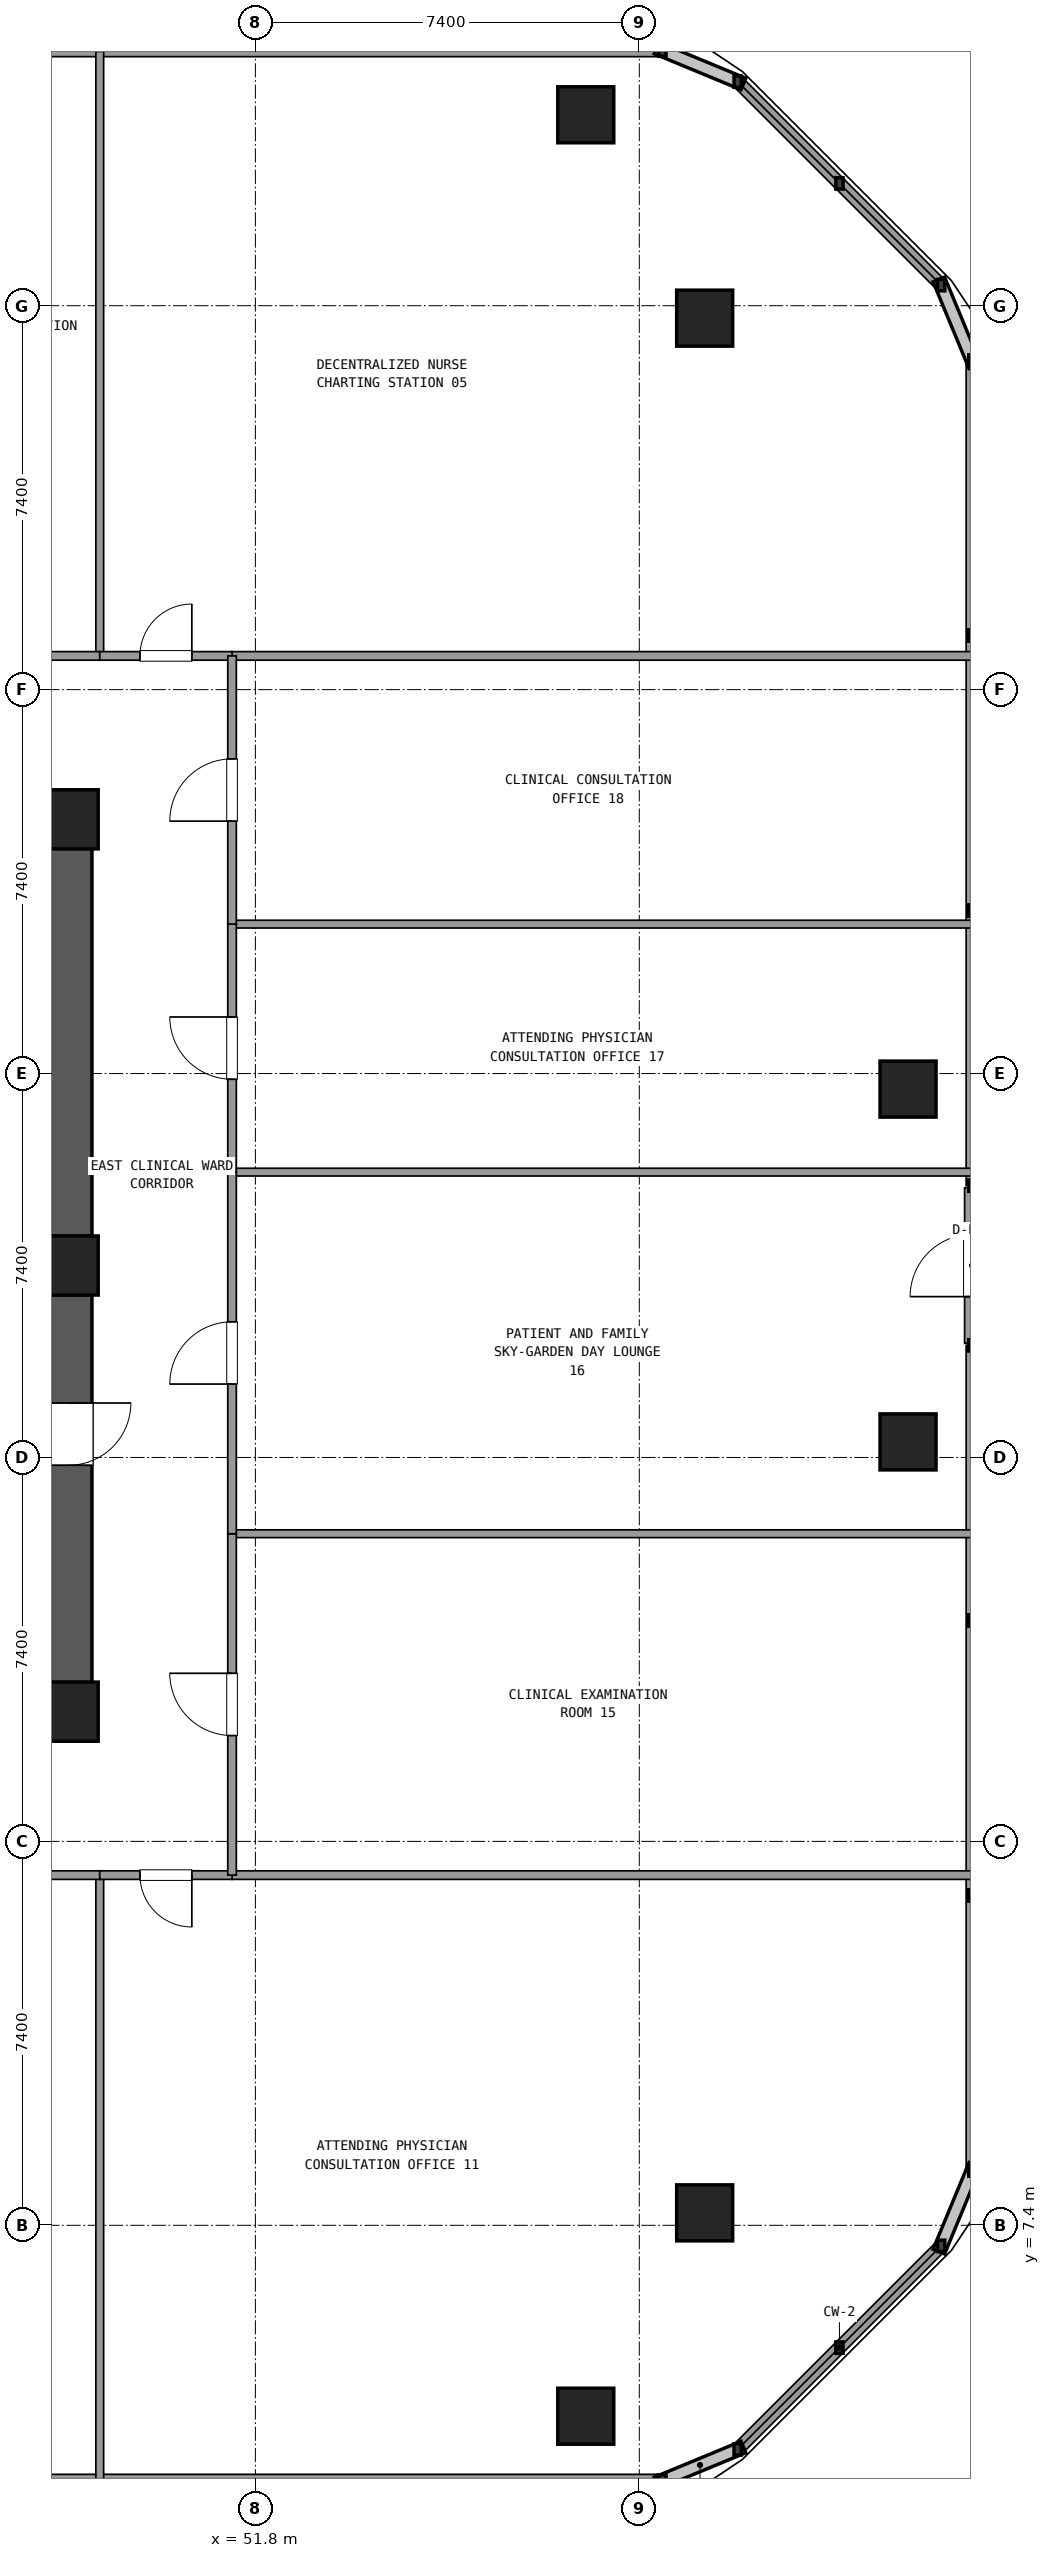
"""IFC4 building model, lengths in metres.
Left out: names, types, materials, properties, quantities, classifications, styles, units other than length and angle.
Written with IfcOpenShell. Run it as: python <this file> out.ifc"""

import sys

from ifc_helpers import new_model, si_unit, direction, frame, frame_2d, origin, origin_2d, place, context, subcontext, project, spatial, rectangle, extrude, element, fill, save


model = new_model("IFC4")
c1 = context("Model", 3, precision=1e-05, world=origin(), true_north=direction((0.0, 1.0)))
c2 = subcontext(c1, "Body", "Model", "MODEL_VIEW")
j1 = project(units=[si_unit("LENGTHUNIT", "METRE"), si_unit("PLANEANGLEUNIT", "RADIAN")], contexts=[c1])
p1 = place(None, origin())
s1 = spatial("IfcSite", under=j1, at=p1, CompositionType="ELEMENT")
p2 = place(p1, origin())
s2 = spatial("IfcBuilding", under=s1, at=p2, CompositionType="ELEMENT")
p3 = place(p2, frame((0.0, 0.0, 27.54)))
s3 = spatial("IfcBuildingStorey", under=s2, at=p3, CompositionType="ELEMENT", Elevation=27.54)
for number, where, z_axis, x_axis in (
    (1, (48.2, 17.3, 0.0), (0.0, 0.0, 1.0), (1.0, 0.0, 0.0)),
    (2, (48.2, 25.9, 0.0), (0.0, 0.0, 1.0), (1.0, 0.0, 0.0)),
    (3, (48.2, 34.5, 0.0), (0.0, 0.0, 1.0), (1.0, 0.0, 0.0)),
):
    element("IfcColumn", number, at=place(p3, frame(where, z_axis=z_axis, x_axis=x_axis)), inside=s3, PredefinedType="COLUMN", context=c2, shape_type="SweptSolid", body=[
        extrude(rectangle(XDim=1.14, YDim=1.14, at=origin_2d()), origin(), (0.0, 0.0, 1.0), 3.6),
    ])
p4 = place(p3, frame((48.2, 17.865, 0.0), z_axis=(0.0, 0.0, 1.0), x_axis=(0.0, 1.0, 0.0)))
e4 = element("IfcWall", 4, at=p4, inside=s3, PredefinedType="SHEAR", context=c2, shape_type="SweptSolid", body=[
    extrude(rectangle(XDim=7.47, YDim=0.9, at=frame_2d((3.735, 0.0))), origin(), (0.0, 0.0, 1.0), 3.32),
])
p5 = place(p4, frame((4.185, 0.0, 0.0)))
e5 = element("IfcOpeningElement", 5, at=p5, cuts=e4, PredefinedType="OPENING", context=c2, shape_type="SweptSolid", body=[
    extrude(rectangle(XDim=1.2, YDim=2.15, at=frame_2d((0.6, 1.075))), frame((0.0, 0.46, 0.0), z_axis=(0.0, -1.0, 0.0), x_axis=(1.0, 0.0, 0.0)), (0.0, 0.0, 1.0), 0.92),
])
p6 = place(p3, frame((48.2, 26.465, 0.0), z_axis=(0.0, 0.0, 1.0), x_axis=(0.0, 1.0, 0.0)))
e6 = element("IfcWall", 6, at=p6, inside=s3, PredefinedType="SHEAR", context=c2, shape_type="SweptSolid", body=[
    extrude(rectangle(XDim=7.47, YDim=0.9, at=frame_2d((3.735, 0.0))), origin(), (0.0, 0.0, 1.0), 3.32),
])
for number, where, z_axis, x_axis in (
    (7, (58.168, 3.72, 0.0), (0.0, 0.0, 1.0), (1.0, 0.0, 0.0)),
    (8, (60.46, 7.64, 0.0), (0.0, 0.0, 1.0), (1.0, 0.0, 0.0)),
    (9, (64.38, 22.5, 0.0), (0.0, 0.0, 1.0), (1.0, 0.0, 0.0)),
    (10, (64.38, 29.3, 0.0), (0.0, 0.0, 1.0), (1.0, 0.0, 0.0)),
    (11, (60.46, 44.16, 0.0), (0.0, 0.0, 1.0), (1.0, 0.0, 0.0)),
    (12, (58.168, 48.08, 0.0), (0.0, 0.0, 1.0), (1.0, 0.0, 0.0)),
):
    element("IfcColumn", number, at=place(p3, frame(where, z_axis=z_axis, x_axis=x_axis)), inside=s3, PredefinedType="COLUMN", context=c2, shape_type="SweptSolid", body=[
        extrude(rectangle(XDim=1.08, YDim=1.08, at=origin_2d()), origin(), (0.0, 0.0, 1.0), 3.6),
    ])
p7 = place(p3, frame((14.355, 2.48, 0.0), z_axis=(0.0, 0.0, 1.0), x_axis=(1.0, 0.0, 0.0)))
e13 = element("IfcWall", 13, at=p7, inside=s3, PredefinedType="SOLIDWALL", context=c2, shape_type="SweptSolid", body=[
    extrude(rectangle(XDim=45.29, YDim=0.24, at=frame_2d((22.645, 0.0))), origin(), (0.0, 0.0, 1.0), 0.85),
])
p8 = place(p3, frame((61.096, 3.081, 0.0), z_axis=(0.0, 0.0, 1.0), x_axis=(0.707128783731, 0.707084777957, 0.0)))
e14 = element("IfcWall", 14, at=p8, inside=s3, PredefinedType="SOLIDWALL", context=c2, shape_type="SweptSolid", body=[
    extrude(rectangle(XDim=5.548, YDim=0.24, at=frame_2d((2.774, 0.0))), origin(), (0.0, 0.0, 1.0), 0.85),
])
p9 = place(p3, frame((65.62, 24.4, 0.0), z_axis=(0.0, 0.0, 1.0), x_axis=(0.0, 1.0, 0.0)))
e15 = element("IfcWall", 15, at=p9, inside=s3, PredefinedType="SOLIDWALL", context=c2, shape_type="SweptSolid", body=[
    extrude(rectangle(XDim=3.0, YDim=0.3, at=frame_2d((1.5, 0.0))), origin(), (0.0, 0.0, 1.0), 2.65),
])
p10 = place(p9, frame((0.9, 0.0, 0.0)))
e16 = element("IfcOpeningElement", 16, at=p10, cuts=e15, PredefinedType="OPENING", context=c2, shape_type="SweptSolid", body=[
    extrude(rectangle(XDim=1.2, YDim=2.2, at=frame_2d((0.6, 1.1))), frame((0.0, 0.16, 0.0), z_axis=(0.0, -1.0, 0.0), x_axis=(1.0, 0.0, 0.0)), (0.0, 0.0, 1.0), 0.32),
])
for number, where, z_axis, x_axis in (
    (17, (65.62, 8.455, 0.0), (0.0, 0.0, 1.0), (0.0, 1.0, 0.0)),
    (18, (65.62, 27.44, 0.0), (0.0, 0.0, 1.0), (0.0, 1.0, 0.0)),
):
    element("IfcWall", number, at=place(p3, frame(where, z_axis=z_axis, x_axis=x_axis)), inside=s3, PredefinedType="SOLIDWALL", context=c2, shape_type="SweptSolid", body=[
        extrude(rectangle(XDim=15.905, YDim=0.24, at=frame_2d((7.953, 0.0))), origin(), (0.0, 0.0, 1.0), 0.85),
    ])
p11 = place(p3, frame((65.019, 44.796, 0.0), z_axis=(0.0, 0.0, 1.0), x_axis=(-0.707106781187, 0.707106781187, 0.0)))
e19 = element("IfcWall", 19, at=p11, inside=s3, PredefinedType="SOLIDWALL", context=c2, shape_type="SweptSolid", body=[
    extrude(rectangle(XDim=5.548, YDim=0.24, at=frame_2d((2.774, 0.0))), origin(), (0.0, 0.0, 1.0), 0.85),
])
p12 = place(p3, frame((59.645, 49.32, 0.0), z_axis=(0.0, 0.0, 1.0), x_axis=(-1.0, 0.0, 0.0)))
e20 = element("IfcWall", 20, at=p12, inside=s3, PredefinedType="SOLIDWALL", context=c2, shape_type="SweptSolid", body=[
    extrude(rectangle(XDim=45.29, YDim=0.24, at=frame_2d((22.645, 0.0))), origin(), (0.0, 0.0, 1.0), 0.85),
])
for number, where, z_axis, x_axis in (
    (21, (51.35, 37.65, 0.0), (0.0, 0.0, 1.0), (1.0, 0.0, 0.0)),
    (22, (51.35, 14.15, 0.0), (0.0, 0.0, 1.0), (1.0, 0.0, 0.0)),
):
    element("IfcWall", number, at=place(p3, frame(where, z_axis=z_axis, x_axis=x_axis)), inside=s3, PredefinedType="PARTITIONING", context=c2, shape_type="SweptSolid", body=[
        extrude(rectangle(XDim=14.25, YDim=0.165, at=frame_2d((7.125, 0.0))), origin(), (0.0, 0.0, 1.0), 2.61),
    ])
p13 = place(p3, frame((48.8, 37.65, 0.0), z_axis=(0.0, 0.0, 1.0), x_axis=(0.0, 1.0, 0.0)))
e23 = element("IfcWall", 23, at=p13, inside=s3, PredefinedType="PARTITIONING", context=c2, shape_type="SweptSolid", body=[
    extrude(rectangle(XDim=11.65, YDim=0.15, at=frame_2d((5.825, 0.0))), origin(), (0.0, 0.0, 1.0), 2.61),
])
p14 = place(p3, frame((44.722, 37.65, 0.0), z_axis=(0.0, 0.0, 1.0), x_axis=(1.0, 0.0, 0.0)))
e24 = element("IfcWall", 24, at=p14, inside=s3, PredefinedType="PARTITIONING", context=c2, shape_type="SweptSolid", body=[
    extrude(rectangle(XDim=4.078, YDim=0.165, at=frame_2d((2.039, 0.0))), origin(), (0.0, 0.0, 1.0), 2.61),
])
p15 = place(p14, frame((1.439, 0.0, 0.0)))
e25 = element("IfcOpeningElement", 25, at=p15, cuts=e24, PredefinedType="OPENING", context=c2, shape_type="SweptSolid", body=[
    extrude(rectangle(XDim=1.2, YDim=2.15, at=frame_2d((0.6, 1.075))), frame((0.0, 0.093, 0.0), z_axis=(0.0, -1.0, 0.0), x_axis=(1.0, 0.0, 0.0)), (0.0, 0.0, 1.0), 0.185),
])
p16 = place(p3, frame((48.8, 37.65, 0.0), z_axis=(0.0, 0.0, 1.0), x_axis=(1.0, 0.0, 0.0)))
e26 = element("IfcWall", 26, at=p16, inside=s3, PredefinedType="PARTITIONING", context=c2, shape_type="SweptSolid", body=[
    extrude(rectangle(XDim=2.55, YDim=0.165, at=frame_2d((1.275, 0.0))), origin(), (0.0, 0.0, 1.0), 2.61),
])
p17 = place(p16, frame((0.775, 0.0, 0.0)))
e27 = element("IfcOpeningElement", 27, at=p17, cuts=e26, PredefinedType="OPENING", context=c2, shape_type="SweptSolid", body=[
    extrude(rectangle(XDim=1.0, YDim=2.15, at=frame_2d((0.5, 1.075))), frame((0.0, 0.093, 0.0), z_axis=(0.0, -1.0, 0.0), x_axis=(1.0, 0.0, 0.0)), (0.0, 0.0, 1.0), 0.185),
])
p18 = place(p3, frame((48.8, 14.15, 0.0), z_axis=(0.0, 0.0, 1.0), x_axis=(0.0, -1.0, 0.0)))
e28 = element("IfcWall", 28, at=p18, inside=s3, PredefinedType="PARTITIONING", context=c2, shape_type="SweptSolid", body=[
    extrude(rectangle(XDim=11.65, YDim=0.15, at=frame_2d((5.825, 0.0))), origin(), (0.0, 0.0, 1.0), 2.61),
])
p19 = place(p3, frame((40.31, 14.15, 0.0), z_axis=(0.0, 0.0, 1.0), x_axis=(1.0, 0.0, 0.0)))
e29 = element("IfcWall", 29, at=p19, inside=s3, PredefinedType="PARTITIONING", context=c2, shape_type="SweptSolid", body=[
    extrude(rectangle(XDim=8.49, YDim=0.165, at=frame_2d((4.245, 0.0))), origin(), (0.0, 0.0, 1.0), 2.61),
])
p20 = place(p19, frame((3.645, 0.0, 0.0)))
e30 = element("IfcOpeningElement", 30, at=p20, cuts=e29, PredefinedType="OPENING", context=c2, shape_type="SweptSolid", body=[
    extrude(rectangle(XDim=1.2, YDim=2.15, at=frame_2d((0.6, 1.075))), frame((0.0, 0.093, 0.0), z_axis=(0.0, -1.0, 0.0), x_axis=(1.0, 0.0, 0.0)), (0.0, 0.0, 1.0), 0.185),
])
p21 = place(p3, frame((48.8, 14.15, 0.0), z_axis=(0.0, 0.0, 1.0), x_axis=(1.0, 0.0, 0.0)))
e31 = element("IfcWall", 31, at=p21, inside=s3, PredefinedType="PARTITIONING", context=c2, shape_type="SweptSolid", body=[
    extrude(rectangle(XDim=2.55, YDim=0.165, at=frame_2d((1.275, 0.0))), origin(), (0.0, 0.0, 1.0), 2.61),
])
p22 = place(p21, frame((0.775, 0.0, 0.0)))
e32 = element("IfcOpeningElement", 32, at=p22, cuts=e31, PredefinedType="OPENING", context=c2, shape_type="SweptSolid", body=[
    extrude(rectangle(XDim=1.0, YDim=2.15, at=frame_2d((0.5, 1.075))), frame((0.0, 0.093, 0.0), z_axis=(0.0, -1.0, 0.0), x_axis=(1.0, 0.0, 0.0)), (0.0, 0.0, 1.0), 0.185),
])
p23 = place(p3, frame((51.35, 20.73, 0.0), z_axis=(0.0, 0.0, 1.0), x_axis=(1.0, 0.0, 0.0)))
e33 = element("IfcWall", 33, at=p23, inside=s3, PredefinedType="PARTITIONING", context=c2, shape_type="SweptSolid", body=[
    extrude(rectangle(XDim=14.25, YDim=0.15, at=frame_2d((7.125, 0.0))), origin(), (0.0, 0.0, 1.0), 2.61),
])
p24 = place(p3, frame((51.35, 14.15, 0.0), z_axis=(0.0, 0.0, 1.0), x_axis=(0.0, 1.0, 0.0)))
e34 = element("IfcWall", 34, at=p24, inside=s3, PredefinedType="PARTITIONING", context=c2, shape_type="SweptSolid", body=[
    extrude(rectangle(XDim=6.58, YDim=0.165, at=frame_2d((3.29, 0.0))), origin(), (0.0, 0.0, 1.0), 2.61),
])
p25 = place(p24, frame((2.69, 0.0, 0.0)))
e35 = element("IfcOpeningElement", 35, at=p25, cuts=e34, PredefinedType="OPENING", context=c2, shape_type="SweptSolid", body=[
    extrude(rectangle(XDim=1.2, YDim=2.15, at=frame_2d((0.6, 1.075))), frame((0.0, 0.093, 0.0), z_axis=(0.0, -1.0, 0.0), x_axis=(1.0, 0.0, 0.0)), (0.0, 0.0, 1.0), 0.185),
])
p26 = place(p3, frame((51.35, 27.7, 0.0), z_axis=(0.0, 0.0, 1.0), x_axis=(1.0, 0.0, 0.0)))
e36 = element("IfcWall", 36, at=p26, inside=s3, PredefinedType="PARTITIONING", context=c2, shape_type="SweptSolid", body=[
    extrude(rectangle(XDim=14.25, YDim=0.15, at=frame_2d((7.125, 0.0))), origin(), (0.0, 0.0, 1.0), 2.61),
])
p27 = place(p3, frame((51.35, 20.73, 0.0), z_axis=(0.0, 0.0, 1.0), x_axis=(0.0, 1.0, 0.0)))
e37 = element("IfcWall", 37, at=p27, inside=s3, PredefinedType="PARTITIONING", context=c2, shape_type="SweptSolid", body=[
    extrude(rectangle(XDim=6.97, YDim=0.165, at=frame_2d((3.485, 0.0))), origin(), (0.0, 0.0, 1.0), 2.61),
])
p28 = place(p27, frame((2.885, 0.0, 0.0)))
e38 = element("IfcOpeningElement", 38, at=p28, cuts=e37, PredefinedType="OPENING", context=c2, shape_type="SweptSolid", body=[
    extrude(rectangle(XDim=1.2, YDim=2.15, at=frame_2d((0.6, 1.075))), frame((0.0, 0.093, 0.0), z_axis=(0.0, -1.0, 0.0), x_axis=(1.0, 0.0, 0.0)), (0.0, 0.0, 1.0), 0.185),
])
p29 = place(p3, frame((51.35, 32.48, 0.0), z_axis=(0.0, 0.0, 1.0), x_axis=(1.0, 0.0, 0.0)))
e39 = element("IfcWall", 39, at=p29, inside=s3, PredefinedType="PARTITIONING", context=c2, shape_type="SweptSolid", body=[
    extrude(rectangle(XDim=14.25, YDim=0.15, at=frame_2d((7.125, 0.0))), origin(), (0.0, 0.0, 1.0), 2.61),
])
p30 = place(p3, frame((51.35, 27.7, 0.0), z_axis=(0.0, 0.0, 1.0), x_axis=(0.0, 1.0, 0.0)))
e40 = element("IfcWall", 40, at=p30, inside=s3, PredefinedType="PARTITIONING", context=c2, shape_type="SweptSolid", body=[
    extrude(rectangle(XDim=4.78, YDim=0.165, at=frame_2d((2.39, 0.0))), origin(), (0.0, 0.0, 1.0), 2.61),
])
p31 = place(p30, frame((1.79, 0.0, 0.0)))
e41 = element("IfcOpeningElement", 41, at=p31, cuts=e40, PredefinedType="OPENING", context=c2, shape_type="SweptSolid", body=[
    extrude(rectangle(XDim=1.2, YDim=2.15, at=frame_2d((0.6, 1.075))), frame((0.0, 0.093, 0.0), z_axis=(0.0, -1.0, 0.0), x_axis=(1.0, 0.0, 0.0)), (0.0, 0.0, 1.0), 0.185),
])
p32 = place(p3, frame((51.35, 32.48, 0.0), z_axis=(0.0, 0.0, 1.0), x_axis=(0.0, 1.0, 0.0)))
e42 = element("IfcWall", 42, at=p32, inside=s3, PredefinedType="PARTITIONING", context=c2, shape_type="SweptSolid", body=[
    extrude(rectangle(XDim=5.17, YDim=0.165, at=frame_2d((2.585, 0.0))), origin(), (0.0, 0.0, 1.0), 2.61),
])
p33 = place(p32, frame((1.985, 0.0, 0.0)))
e43 = element("IfcOpeningElement", 43, at=p33, cuts=e42, PredefinedType="OPENING", context=c2, shape_type="SweptSolid", body=[
    extrude(rectangle(XDim=1.2, YDim=2.15, at=frame_2d((0.6, 1.075))), frame((0.0, 0.093, 0.0), z_axis=(0.0, -1.0, 0.0), x_axis=(1.0, 0.0, 0.0)), (0.0, 0.0, 1.0), 0.185),
])
p34 = place(p5, frame((1.2, 0.0, 0.0), z_axis=(0.0, 0.0, 1.0), x_axis=(-1.0, 0.0, 0.0)))
e44 = element("IfcDoor", 44, at=p34, inside=s3, OperationType="SINGLE_SWING_RIGHT", PredefinedType="DOOR", context=c2, shape_type="SweptSolid", body=[
    extrude(rectangle(XDim=1.2, YDim=2.15, at=frame_2d((0.6, 1.075))), frame((0.0, 0.025, 0.0), z_axis=(0.0, -1.0, 0.0), x_axis=(1.0, 0.0, 0.0)), (0.0, 0.0, 1.0), 0.05),
])
fill(e5, e44)
p35 = place(p17, origin())
e45 = element("IfcDoor", 45, at=p35, inside=s3, OperationType="SINGLE_SWING_RIGHT", PredefinedType="DOOR", context=c2, shape_type="SweptSolid", body=[
    extrude(rectangle(XDim=1.0, YDim=2.15, at=frame_2d((0.5, 1.075))), frame((0.0, 0.025, 0.0), z_axis=(0.0, -1.0, 0.0), x_axis=(1.0, 0.0, 0.0)), (0.0, 0.0, 1.0), 0.05),
])
fill(e27, e45)
p36 = place(p22, frame((1.0, 0.0, 0.0), z_axis=(0.0, 0.0, 1.0), x_axis=(-1.0, 0.0, 0.0)))
e46 = element("IfcDoor", 46, at=p36, inside=s3, OperationType="SINGLE_SWING_RIGHT", PredefinedType="DOOR", context=c2, shape_type="SweptSolid", body=[
    extrude(rectangle(XDim=1.0, YDim=2.15, at=frame_2d((0.5, 1.075))), frame((0.0, 0.025, 0.0), z_axis=(0.0, -1.0, 0.0), x_axis=(1.0, 0.0, 0.0)), (0.0, 0.0, 1.0), 0.05),
])
fill(e32, e46)
p37 = place(p25, origin())
e47 = element("IfcDoor", 47, at=p37, inside=s3, OperationType="SINGLE_SWING_RIGHT", PredefinedType="DOOR", context=c2, shape_type="SweptSolid", body=[
    extrude(rectangle(XDim=1.2, YDim=2.15, at=frame_2d((0.6, 1.075))), frame((0.0, 0.025, 0.0), z_axis=(0.0, -1.0, 0.0), x_axis=(1.0, 0.0, 0.0)), (0.0, 0.0, 1.0), 0.05),
])
fill(e35, e47)
p38 = place(p28, origin())
e48 = element("IfcDoor", 48, at=p38, inside=s3, OperationType="SINGLE_SWING_LEFT", PredefinedType="DOOR", context=c2, shape_type="SweptSolid", body=[
    extrude(rectangle(XDim=1.2, YDim=2.15, at=frame_2d((0.6, 1.075))), frame((0.0, 0.025, 0.0), z_axis=(0.0, -1.0, 0.0), x_axis=(1.0, 0.0, 0.0)), (0.0, 0.0, 1.0), 0.05),
])
fill(e38, e48)
p39 = place(p31, origin())
e49 = element("IfcDoor", 49, at=p39, inside=s3, OperationType="SINGLE_SWING_RIGHT", PredefinedType="DOOR", context=c2, shape_type="SweptSolid", body=[
    extrude(rectangle(XDim=1.2, YDim=2.15, at=frame_2d((0.6, 1.075))), frame((0.0, 0.025, 0.0), z_axis=(0.0, -1.0, 0.0), x_axis=(1.0, 0.0, 0.0)), (0.0, 0.0, 1.0), 0.05),
])
fill(e41, e49)
p40 = place(p33, origin())
e50 = element("IfcDoor", 50, at=p40, inside=s3, OperationType="SINGLE_SWING_LEFT", PredefinedType="DOOR", context=c2, shape_type="SweptSolid", body=[
    extrude(rectangle(XDim=1.2, YDim=2.15, at=frame_2d((0.6, 1.075))), frame((0.0, 0.025, 0.0), z_axis=(0.0, -1.0, 0.0), x_axis=(1.0, 0.0, 0.0)), (0.0, 0.0, 1.0), 0.05),
])
fill(e43, e50)
save(model, sys.argv[1])
